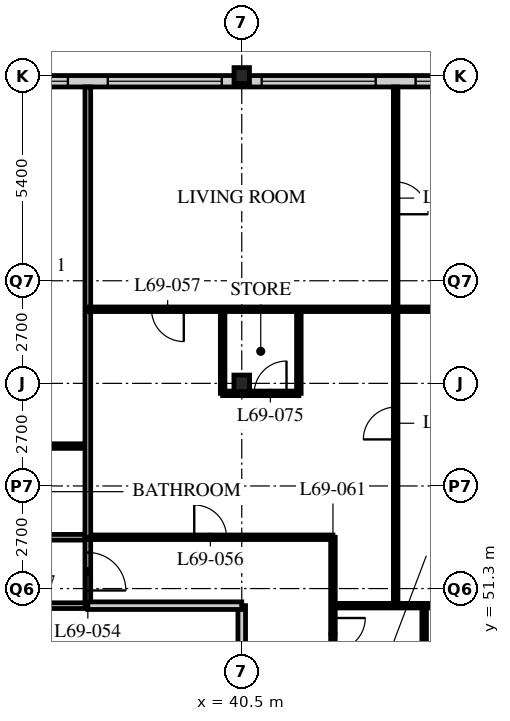
"""IFC4 building model, lengths in metres.
Left out: names, types, materials, properties, quantities, classifications, styles, units other than length and angle.
Written with IfcOpenShell. Run it as: python <this file> out.ifc"""

import sys

from ifc_helpers import new_model, si_unit, direction, frame, frame_2d, origin, origin_2d, place, context, subcontext, project, spatial, rectangle, i_section, extrude, element, fill, save


model = new_model("IFC4")
c1 = context("Model", 3, precision=1e-05, world=origin(), true_north=direction((0.0, 1.0)))
c2 = subcontext(c1, "Body", "Model", "MODEL_VIEW")
j1 = project(units=[si_unit("LENGTHUNIT", "METRE"), si_unit("PLANEANGLEUNIT", "RADIAN")], contexts=[c1])
p1 = place(None, origin())
s1 = spatial("IfcSite", under=j1, at=p1, CompositionType="ELEMENT")
p2 = place(p1, origin())
s2 = spatial("IfcBuilding", under=s1, at=p2, CompositionType="ELEMENT")
p3 = place(p2, frame((0.0, 0.0, 269.7)))
s3 = spatial("IfcBuildingStorey", under=s2, at=p3, CompositionType="ELEMENT", Elevation=269.7)
p4 = place(p3, frame((40.5, 56.7, 0.0), z_axis=(0.0, 0.0, 1.0), x_axis=(1.0, 0.0, 0.0)))
e1 = element("IfcColumn", 1, at=p4, inside=s3, PredefinedType="COLUMN", context=c2, shape_type="SweptSolid", body=[
    extrude(i_section(OverallWidth=0.412, OverallDepth=0.437, WebThickness=0.036, FlangeThickness=0.058, FilletRadius=0.015, at=origin_2d()), origin(), (0.0, 0.0, 1.0), 3.9),
])
p5 = place(p3, frame((40.5, 64.8, 0.0), z_axis=(0.0, 0.0, 1.0), x_axis=(1.0, 0.0, 0.0)))
e2 = element("IfcColumn", 2, at=p5, inside=s3, PredefinedType="COLUMN", context=c2, shape_type="SweptSolid", body=[
    extrude(i_section(OverallWidth=0.407, OverallDepth=0.419, WebThickness=0.031, FlangeThickness=0.049, FilletRadius=0.015, at=origin_2d()), origin(), (0.0, 0.0, 1.0), 3.9),
])
p6 = place(p3, frame((48.3, 64.65, 0.0), z_axis=(0.0, 0.0, 1.0), x_axis=(-1.0, 0.0, 0.0)))
e3 = element("IfcWall", 3, at=p6, inside=s3, PredefinedType="SOLIDWALL", context=c2, shape_type="SweptSolid", body=[
    extrude(rectangle(XDim=40.2, YDim=0.3, at=frame_2d((20.1, 0.0))), origin(), (0.0, 0.0, 1.0), 3.69),
])
p7 = place(p6, frame((0.225, 0.0, 0.6)))
e4 = element("IfcOpeningElement", 4, at=p7, cuts=e3, PredefinedType="OPENING", context=c2, shape_type="SweptSolid", body=[
    extrude(rectangle(XDim=3.0, YDim=2.4, at=frame_2d((1.5, 1.2))), frame((0.0, 0.16, 0.0), z_axis=(0.0, -1.0, 0.0), x_axis=(1.0, 0.0, 0.0)), (0.0, 0.0, 1.0), 0.32),
])
p8 = place(p6, frame((4.275, 0.0, 0.6)))
e5 = element("IfcOpeningElement", 5, at=p8, cuts=e3, PredefinedType="OPENING", context=c2, shape_type="SweptSolid", body=[
    extrude(rectangle(XDim=3.0, YDim=2.4, at=frame_2d((1.5, 1.2))), frame((0.0, 0.16, 0.0), z_axis=(0.0, -1.0, 0.0), x_axis=(1.0, 0.0, 0.0)), (0.0, 0.0, 1.0), 0.32),
])
p9 = place(p6, frame((8.325, 0.0, 0.6)))
e6 = element("IfcOpeningElement", 6, at=p9, cuts=e3, PredefinedType="OPENING", context=c2, shape_type="SweptSolid", body=[
    extrude(rectangle(XDim=3.0, YDim=2.4, at=frame_2d((1.5, 1.2))), frame((0.0, 0.16, 0.0), z_axis=(0.0, -1.0, 0.0), x_axis=(1.0, 0.0, 0.0)), (0.0, 0.0, 1.0), 0.32),
])
p10 = place(p6, frame((12.375, 0.0, 0.6)))
e7 = element("IfcOpeningElement", 7, at=p10, cuts=e3, PredefinedType="OPENING", context=c2, shape_type="SweptSolid", body=[
    extrude(rectangle(XDim=3.0, YDim=2.4, at=frame_2d((1.5, 1.2))), frame((0.0, 0.16, 0.0), z_axis=(0.0, -1.0, 0.0), x_axis=(1.0, 0.0, 0.0)), (0.0, 0.0, 1.0), 0.32),
])
p11 = place(p6, frame((16.425, 0.0, 0.6)))
e8 = element("IfcOpeningElement", 8, at=p11, cuts=e3, PredefinedType="OPENING", context=c2, shape_type="SweptSolid", body=[
    extrude(rectangle(XDim=3.0, YDim=2.4, at=frame_2d((1.5, 1.2))), frame((0.0, 0.16, 0.0), z_axis=(0.0, -1.0, 0.0), x_axis=(1.0, 0.0, 0.0)), (0.0, 0.0, 1.0), 0.32),
])
p12 = place(p6, frame((20.475, 0.0, 0.6)))
e9 = element("IfcOpeningElement", 9, at=p12, cuts=e3, PredefinedType="OPENING", context=c2, shape_type="SweptSolid", body=[
    extrude(rectangle(XDim=3.0, YDim=2.4, at=frame_2d((1.5, 1.2))), frame((0.0, 0.16, 0.0), z_axis=(0.0, -1.0, 0.0), x_axis=(1.0, 0.0, 0.0)), (0.0, 0.0, 1.0), 0.32),
])
p13 = place(p6, frame((24.525, 0.0, 0.6)))
e10 = element("IfcOpeningElement", 10, at=p13, cuts=e3, PredefinedType="OPENING", context=c2, shape_type="SweptSolid", body=[
    extrude(rectangle(XDim=3.0, YDim=2.4, at=frame_2d((1.5, 1.2))), frame((0.0, 0.16, 0.0), z_axis=(0.0, -1.0, 0.0), x_axis=(1.0, 0.0, 0.0)), (0.0, 0.0, 1.0), 0.32),
])
p14 = place(p6, frame((28.575, 0.0, 0.6)))
e11 = element("IfcOpeningElement", 11, at=p14, cuts=e3, PredefinedType="OPENING", context=c2, shape_type="SweptSolid", body=[
    extrude(rectangle(XDim=3.0, YDim=2.4, at=frame_2d((1.5, 1.2))), frame((0.0, 0.16, 0.0), z_axis=(0.0, -1.0, 0.0), x_axis=(1.0, 0.0, 0.0)), (0.0, 0.0, 1.0), 0.32),
])
p15 = place(p6, frame((32.625, 0.0, 0.6)))
e12 = element("IfcOpeningElement", 12, at=p15, cuts=e3, PredefinedType="OPENING", context=c2, shape_type="SweptSolid", body=[
    extrude(rectangle(XDim=3.0, YDim=2.4, at=frame_2d((1.5, 1.2))), frame((0.0, 0.16, 0.0), z_axis=(0.0, -1.0, 0.0), x_axis=(1.0, 0.0, 0.0)), (0.0, 0.0, 1.0), 0.32),
])
p16 = place(p6, frame((36.675, 0.0, 0.6)))
e13 = element("IfcOpeningElement", 13, at=p16, cuts=e3, PredefinedType="OPENING", context=c2, shape_type="SweptSolid", body=[
    extrude(rectangle(XDim=3.0, YDim=2.4, at=frame_2d((1.5, 1.2))), frame((0.0, 0.16, 0.0), z_axis=(0.0, -1.0, 0.0), x_axis=(1.0, 0.0, 0.0)), (0.0, 0.0, 1.0), 0.32),
])
p17 = place(p3, frame((12.15, 52.65, 0.0), z_axis=(0.0, 0.0, 1.0), x_axis=(1.0, 0.0, 0.0)))
e14 = element("IfcWall", 14, at=p17, inside=s3, PredefinedType="PARTITIONING", context=c2, shape_type="SweptSolid", body=[
    extrude(rectangle(XDim=24.3, YDim=0.15, at=frame_2d((12.15, 0.0))), origin(), (0.0, 0.0, 1.0), 3.69),
])
p18 = place(p17, frame((6.4, 0.0, 0.0)))
e15 = element("IfcOpeningElement", 15, at=p18, cuts=e14, PredefinedType="OPENING", context=c2, shape_type="SweptSolid", body=[
    extrude(rectangle(XDim=1.0, YDim=2.1, at=frame_2d((0.5, 1.05))), frame((0.0, 0.085, 0.0), z_axis=(0.0, -1.0, 0.0), x_axis=(1.0, 0.0, 0.0)), (0.0, 0.0, 1.0), 0.17),
])
p19 = place(p17, frame((8.5, 0.0, 0.0)))
e16 = element("IfcOpeningElement", 16, at=p19, cuts=e14, PredefinedType="OPENING", context=c2, shape_type="SweptSolid", body=[
    extrude(rectangle(XDim=1.0, YDim=2.1, at=frame_2d((0.5, 1.05))), frame((0.0, 0.085, 0.0), z_axis=(0.0, -1.0, 0.0), x_axis=(1.0, 0.0, 0.0)), (0.0, 0.0, 1.0), 0.17),
])
p20 = place(p17, frame((16.6, 0.0, 0.0)))
e17 = element("IfcOpeningElement", 17, at=p20, cuts=e14, PredefinedType="OPENING", context=c2, shape_type="SweptSolid", body=[
    extrude(rectangle(XDim=1.0, YDim=2.1, at=frame_2d((0.5, 1.05))), frame((0.0, 0.085, 0.0), z_axis=(0.0, -1.0, 0.0), x_axis=(1.0, 0.0, 0.0)), (0.0, 0.0, 1.0), 0.17),
])
p21 = place(p17, frame((1.525, 0.0, 0.0)))
e18 = element("IfcOpeningElement", 18, at=p21, cuts=e14, PredefinedType="OPENING", context=c2, shape_type="SweptSolid", body=[
    extrude(rectangle(XDim=1.0, YDim=2.1, at=frame_2d((0.5, 1.05))), frame((0.0, 0.085, 0.0), z_axis=(0.0, -1.0, 0.0), x_axis=(1.0, 0.0, 0.0)), (0.0, 0.0, 1.0), 0.17),
])
p22 = place(p3, frame((29.56, 50.85, 0.0), z_axis=(0.0, 0.0, 1.0), x_axis=(1.0, 0.0, 0.0)))
e19 = element("IfcWall", 19, at=p22, inside=s3, PredefinedType="PARTITIONING", context=c2, shape_type="SweptSolid", body=[
    extrude(rectangle(XDim=6.89, YDim=0.15, at=frame_2d((3.445, 0.0))), origin(), (0.0, 0.0, 1.0), 3.69),
])
p23 = place(p22, frame((1.49, 0.0, 0.0)))
e20 = element("IfcOpeningElement", 20, at=p23, cuts=e19, PredefinedType="OPENING", context=c2, shape_type="SweptSolid", body=[
    extrude(rectangle(XDim=1.0, YDim=2.1, at=frame_2d((0.5, 1.05))), frame((0.0, 0.085, 0.0), z_axis=(0.0, -1.0, 0.0), x_axis=(1.0, 0.0, 0.0)), (0.0, 0.0, 1.0), 0.17),
])
p24 = place(p22, frame((4.69, 0.0, 0.0)))
e21 = element("IfcOpeningElement", 21, at=p24, cuts=e19, PredefinedType="OPENING", context=c2, shape_type="SweptSolid", body=[
    extrude(rectangle(XDim=1.0, YDim=2.1, at=frame_2d((0.5, 1.05))), frame((0.0, 0.085, 0.0), z_axis=(0.0, -1.0, 0.0), x_axis=(1.0, 0.0, 0.0)), (0.0, 0.0, 1.0), 0.17),
])
p25 = place(p3, frame((36.45, 50.85, 0.0), z_axis=(0.0, 0.0, 1.0), x_axis=(0.0, 1.0, 0.0)))
e22 = element("IfcWall", 22, at=p25, inside=s3, PredefinedType="PARTITIONING", context=c2, shape_type="SweptSolid", body=[
    extrude(rectangle(XDim=1.8, YDim=0.15, at=frame_2d((0.9, 0.0))), origin(), (0.0, 0.0, 1.0), 3.69),
])
p26 = place(p25, frame((0.4, 0.0, 0.0)))
e23 = element("IfcOpeningElement", 23, at=p26, cuts=e22, PredefinedType="OPENING", context=c2, shape_type="SweptSolid", body=[
    extrude(rectangle(XDim=1.0, YDim=2.1, at=frame_2d((0.5, 1.05))), frame((0.0, 0.085, 0.0), z_axis=(0.0, -1.0, 0.0), x_axis=(1.0, 0.0, 0.0)), (0.0, 0.0, 1.0), 0.17),
])
p27 = place(p3, frame((40.5, 40.5, 0.0), z_axis=(0.0, 0.0, 1.0), x_axis=(0.0, 1.0, 0.0)))
e24 = element("IfcWall", 24, at=p27, inside=s3, PredefinedType="SOLIDWALL", context=c2, shape_type="SweptSolid", body=[
    extrude(rectangle(XDim=10.35, YDim=0.2, at=frame_2d((5.175, 0.0))), origin(), (0.0, 0.0, 1.0), 3.078),
])
p28 = place(p3, frame((20.25, 55.05, 0.0), z_axis=(0.0, 0.0, 1.0), x_axis=(1.0, 0.0, 0.0)))
e25 = element("IfcWall", 25, at=p28, inside=s3, PredefinedType="PARTITIONING", context=c2, shape_type="SweptSolid", body=[
    extrude(rectangle(XDim=16.2, YDim=0.12, at=frame_2d((8.1, 0.0))), origin(), (0.0, 0.0, 1.0), 3.69),
])
p29 = place(p28, frame((0.975, 0.0, 0.0)))
e26 = element("IfcOpeningElement", 26, at=p29, cuts=e25, PredefinedType="OPENING", context=c2, shape_type="SweptSolid", body=[
    extrude(rectangle(XDim=0.85, YDim=2.1, at=frame_2d((0.425, 1.05))), frame((0.0, 0.07, 0.0), z_axis=(0.0, -1.0, 0.0), x_axis=(1.0, 0.0, 0.0)), (0.0, 0.0, 1.0), 0.14),
])
p30 = place(p28, frame((4.375, 0.0, 0.0)))
e27 = element("IfcOpeningElement", 27, at=p30, cuts=e25, PredefinedType="OPENING", context=c2, shape_type="SweptSolid", body=[
    extrude(rectangle(XDim=0.85, YDim=2.1, at=frame_2d((0.425, 1.05))), frame((0.0, 0.07, 0.0), z_axis=(0.0, -1.0, 0.0), x_axis=(1.0, 0.0, 0.0)), (0.0, 0.0, 1.0), 0.14),
])
p31 = place(p28, frame((9.075, 0.0, 0.0)))
e28 = element("IfcOpeningElement", 28, at=p31, cuts=e25, PredefinedType="OPENING", context=c2, shape_type="SweptSolid", body=[
    extrude(rectangle(XDim=0.85, YDim=2.1, at=frame_2d((0.425, 1.05))), frame((0.0, 0.07, 0.0), z_axis=(0.0, -1.0, 0.0), x_axis=(1.0, 0.0, 0.0)), (0.0, 0.0, 1.0), 0.14),
])
p32 = place(p28, frame((12.475, 0.0, 0.0)))
e29 = element("IfcOpeningElement", 29, at=p32, cuts=e25, PredefinedType="OPENING", context=c2, shape_type="SweptSolid", body=[
    extrude(rectangle(XDim=0.85, YDim=2.1, at=frame_2d((0.425, 1.05))), frame((0.0, 0.07, 0.0), z_axis=(0.0, -1.0, 0.0), x_axis=(1.0, 0.0, 0.0)), (0.0, 0.0, 1.0), 0.14),
])
p33 = place(p3, frame((42.9, 52.65, 0.0), z_axis=(0.0, 0.0, 1.0), x_axis=(0.0, -1.0, 0.0)))
e30 = element("IfcWall", 30, at=p33, inside=s3, PredefinedType="PARTITIONING", context=c2, shape_type="SweptSolid", body=[
    extrude(rectangle(XDim=12.15, YDim=0.12, at=frame_2d((6.075, 0.0))), origin(), (0.0, 0.0, 1.0), 3.69),
])
p34 = place(p33, frame((2.125, 0.0, 0.0)))
e31 = element("IfcOpeningElement", 31, at=p34, cuts=e30, PredefinedType="OPENING", context=c2, shape_type="SweptSolid", body=[
    extrude(rectangle(XDim=0.85, YDim=2.1, at=frame_2d((0.425, 1.05))), frame((0.0, 0.07, 0.0), z_axis=(0.0, -1.0, 0.0), x_axis=(1.0, 0.0, 0.0)), (0.0, 0.0, 1.0), 0.14),
])
p35 = place(p33, frame((8.425, 0.0, 0.0)))
e32 = element("IfcOpeningElement", 32, at=p35, cuts=e30, PredefinedType="OPENING", context=c2, shape_type="SweptSolid", body=[
    extrude(rectangle(XDim=0.85, YDim=2.1, at=frame_2d((0.425, 1.05))), frame((0.0, 0.07, 0.0), z_axis=(0.0, -1.0, 0.0), x_axis=(1.0, 0.0, 0.0)), (0.0, 0.0, 1.0), 0.14),
])
p36 = place(p3, frame((36.45, 52.65, 0.0), z_axis=(0.0, 0.0, 1.0), x_axis=(1.0, 0.0, 0.0)))
e33 = element("IfcWall", 33, at=p36, inside=s3, PredefinedType="PARTITIONING", context=c2, shape_type="SweptSolid", body=[
    extrude(rectangle(XDim=6.45, YDim=0.12, at=frame_2d((3.225, 0.0))), origin(), (0.0, 0.0, 1.0), 3.69),
])
p37 = place(p36, frame((2.8, 0.0, 0.0)))
e34 = element("IfcOpeningElement", 34, at=p37, cuts=e33, PredefinedType="OPENING", context=c2, shape_type="SweptSolid", body=[
    extrude(rectangle(XDim=0.85, YDim=2.1, at=frame_2d((0.425, 1.05))), frame((0.0, 0.07, 0.0), z_axis=(0.0, -1.0, 0.0), x_axis=(1.0, 0.0, 0.0)), (0.0, 0.0, 1.0), 0.14),
])
p38 = place(p3, frame((36.45, 50.85, 0.0), z_axis=(0.0, 0.0, 1.0), x_axis=(1.0, 0.0, 0.0)))
e35 = element("IfcWall", 35, at=p38, inside=s3, PredefinedType="SOLIDWALL", context=c2, shape_type="SweptSolid", body=[
    extrude(rectangle(XDim=4.05, YDim=0.2, at=frame_2d((2.025, 0.0))), origin(), (0.0, 0.0, 1.0), 3.69),
])
p39 = place(p3, frame((42.9, 50.85, 0.0), z_axis=(0.0, 0.0, 1.0), x_axis=(1.0, 0.0, 0.0)))
e36 = element("IfcWall", 36, at=p39, inside=s3, PredefinedType="PARTITIONING", context=c2, shape_type="SweptSolid", body=[
    extrude(rectangle(XDim=13.5, YDim=0.12, at=frame_2d((6.75, 0.0))), origin(), (0.0, 0.0, 1.0), 3.69),
])
p40 = place(p3, frame((36.45, 64.5, 0.0), z_axis=(0.0, 0.0, 1.0), x_axis=(0.0, -1.0, 0.0)))
e37 = element("IfcWall", 37, at=p40, inside=s3, PredefinedType="PARTITIONING", context=c2, shape_type="SweptSolid", body=[
    extrude(rectangle(XDim=11.85, YDim=0.15, at=frame_2d((5.925, 0.0))), origin(), (0.0, 0.0, 1.0), 3.69),
])
p41 = place(p3, frame((36.45, 58.65, 0.0), z_axis=(0.0, 0.0, 1.0), x_axis=(1.0, 0.0, 0.0)))
e38 = element("IfcWall", 38, at=p41, inside=s3, PredefinedType="PARTITIONING", context=c2, shape_type="SweptSolid", body=[
    extrude(rectangle(XDim=15.9, YDim=0.12, at=frame_2d((7.95, 0.0))), origin(), (0.0, 0.0, 1.0), 3.69),
])
p42 = place(p41, frame((1.675, 0.0, 0.0)))
e39 = element("IfcOpeningElement", 39, at=p42, cuts=e38, PredefinedType="OPENING", context=c2, shape_type="SweptSolid", body=[
    extrude(rectangle(XDim=0.85, YDim=2.1, at=frame_2d((0.425, 1.05))), frame((0.0, 0.07, 0.0), z_axis=(0.0, -1.0, 0.0), x_axis=(1.0, 0.0, 0.0)), (0.0, 0.0, 1.0), 0.14),
])
p43 = place(p3, frame((44.55, 64.5, 0.0), z_axis=(0.0, 0.0, 1.0), x_axis=(0.0, -1.0, 0.0)))
e40 = element("IfcWall", 40, at=p43, inside=s3, PredefinedType="PARTITIONING", context=c2, shape_type="SweptSolid", body=[
    extrude(rectangle(XDim=13.65, YDim=0.12, at=frame_2d((6.825, 0.0))), origin(), (0.0, 0.0, 1.0), 3.69),
])
p44 = place(p43, frame((8.425, 0.0, 0.0)))
e41 = element("IfcOpeningElement", 41, at=p44, cuts=e40, PredefinedType="OPENING", context=c2, shape_type="SweptSolid", body=[
    extrude(rectangle(XDim=0.85, YDim=2.1, at=frame_2d((0.425, 1.05))), frame((0.0, 0.07, 0.0), z_axis=(0.0, -1.0, 0.0), x_axis=(1.0, 0.0, 0.0)), (0.0, 0.0, 1.0), 0.14),
])
p45 = place(p43, frame((2.5, 0.0, 0.0)))
e42 = element("IfcOpeningElement", 42, at=p45, cuts=e40, PredefinedType="OPENING", context=c2, shape_type="SweptSolid", body=[
    extrude(rectangle(XDim=0.85, YDim=2.1, at=frame_2d((0.425, 1.05))), frame((0.0, 0.07, 0.0), z_axis=(0.0, -1.0, 0.0), x_axis=(1.0, 0.0, 0.0)), (0.0, 0.0, 1.0), 0.14),
])
p46 = place(p3, frame((45.3, 50.85, 0.0), z_axis=(0.0, 0.0, 1.0), x_axis=(0.0, -1.0, 0.0)))
e43 = element("IfcWall", 43, at=p46, inside=s3, PredefinedType="PARTITIONING", context=c2, shape_type="SweptSolid", body=[
    extrude(rectangle(XDim=4.01, YDim=0.12, at=frame_2d((2.005, 0.0))), origin(), (0.0, 0.0, 1.0), 3.69),
])
p47 = place(p46, frame((2.885, 0.0, 0.0)))
e44 = element("IfcOpeningElement", 44, at=p47, cuts=e43, PredefinedType="OPENING", context=c2, shape_type="SweptSolid", body=[
    extrude(rectangle(XDim=0.85, YDim=2.1, at=frame_2d((0.425, 1.05))), frame((0.0, 0.07, 0.0), z_axis=(0.0, -1.0, 0.0), x_axis=(1.0, 0.0, 0.0)), (0.0, 0.0, 1.0), 0.14),
])
for number, where, z_axis, x_axis in (
    (45, (39.997, 58.65, 0.0), (0.0, 0.0, 1.0), (0.0, -1.0, 0.0)),
    (46, (42.003, 58.65, 0.0), (0.0, 0.0, 1.0), (0.0, -1.0, 0.0)),
):
    element("IfcWall", number, at=place(p3, frame(where, z_axis=z_axis, x_axis=x_axis)), inside=s3, PredefinedType="PARTITIONING", context=c2, shape_type="SweptSolid", body=[
        extrude(rectangle(XDim=2.213, YDim=0.12, at=frame_2d((1.106, 0.0))), origin(), (0.0, 0.0, 1.0), 3.69),
    ])
p48 = place(p3, frame((39.997, 56.437, 0.0), z_axis=(0.0, 0.0, 1.0), x_axis=(1.0, 0.0, 0.0)))
e47 = element("IfcWall", 47, at=p48, inside=s3, PredefinedType="PARTITIONING", context=c2, shape_type="SweptSolid", body=[
    extrude(rectangle(XDim=2.006, YDim=0.12, at=frame_2d((1.003, 0.0))), origin(), (0.0, 0.0, 1.0), 3.69),
])
p49 = place(p48, frame((0.831, 0.0, 0.0)))
e48 = element("IfcOpeningElement", 48, at=p49, cuts=e47, PredefinedType="OPENING", context=c2, shape_type="SweptSolid", body=[
    extrude(rectangle(XDim=0.85, YDim=2.1, at=frame_2d((0.425, 1.05))), frame((0.0, 0.07, 0.0), z_axis=(0.0, -1.0, 0.0), x_axis=(1.0, 0.0, 0.0)), (0.0, 0.0, 1.0), 0.14),
])
p50 = place(p7, origin())
e49 = element("IfcWindow", 49, at=p50, inside=s3, PartitioningType="SINGLE_PANEL", PredefinedType="WINDOW", context=c2, shape_type="SweptSolid", body=[
    extrude(rectangle(XDim=3.0, YDim=2.4, at=frame_2d((1.5, 1.2))), frame((0.0, 0.03, 0.0), z_axis=(0.0, -1.0, 0.0), x_axis=(1.0, 0.0, 0.0)), (0.0, 0.0, 1.0), 0.06),
])
fill(e4, e49)
p51 = place(p8, origin())
e50 = element("IfcWindow", 50, at=p51, inside=s3, PartitioningType="SINGLE_PANEL", PredefinedType="WINDOW", context=c2, shape_type="SweptSolid", body=[
    extrude(rectangle(XDim=3.0, YDim=2.4, at=frame_2d((1.5, 1.2))), frame((0.0, 0.03, 0.0), z_axis=(0.0, -1.0, 0.0), x_axis=(1.0, 0.0, 0.0)), (0.0, 0.0, 1.0), 0.06),
])
fill(e5, e50)
p52 = place(p9, origin())
e51 = element("IfcWindow", 51, at=p52, inside=s3, PartitioningType="SINGLE_PANEL", PredefinedType="WINDOW", context=c2, shape_type="SweptSolid", body=[
    extrude(rectangle(XDim=3.0, YDim=2.4, at=frame_2d((1.5, 1.2))), frame((0.0, 0.03, 0.0), z_axis=(0.0, -1.0, 0.0), x_axis=(1.0, 0.0, 0.0)), (0.0, 0.0, 1.0), 0.06),
])
fill(e6, e51)
p53 = place(p10, origin())
e52 = element("IfcWindow", 52, at=p53, inside=s3, PartitioningType="SINGLE_PANEL", PredefinedType="WINDOW", context=c2, shape_type="SweptSolid", body=[
    extrude(rectangle(XDim=3.0, YDim=2.4, at=frame_2d((1.5, 1.2))), frame((0.0, 0.03, 0.0), z_axis=(0.0, -1.0, 0.0), x_axis=(1.0, 0.0, 0.0)), (0.0, 0.0, 1.0), 0.06),
])
fill(e7, e52)
p54 = place(p26, origin())
e53 = element("IfcDoor", 53, at=p54, inside=s3, OperationType="SINGLE_SWING_RIGHT", PredefinedType="DOOR", context=c2, shape_type="SweptSolid", body=[
    extrude(rectangle(XDim=1.0, YDim=2.1, at=frame_2d((0.5, 1.05))), frame((0.0, 0.025, 0.0), z_axis=(0.0, -1.0, 0.0), x_axis=(1.0, 0.0, 0.0)), (0.0, 0.0, 1.0), 0.05),
])
fill(e23, e53)
p55 = place(p37, origin())
e54 = element("IfcDoor", 54, at=p55, inside=s3, OperationType="SINGLE_SWING_LEFT", PredefinedType="DOOR", context=c2, shape_type="SweptSolid", body=[
    extrude(rectangle(XDim=0.85, YDim=2.1, at=frame_2d((0.425, 1.05))), frame((0.0, 0.025, 0.0), z_axis=(0.0, -1.0, 0.0), x_axis=(1.0, 0.0, 0.0)), (0.0, 0.0, 1.0), 0.05),
])
fill(e34, e54)
p56 = place(p42, origin())
e55 = element("IfcDoor", 55, at=p56, inside=s3, OperationType="SINGLE_SWING_LEFT", PredefinedType="DOOR", context=c2, shape_type="SweptSolid", body=[
    extrude(rectangle(XDim=0.85, YDim=2.1, at=frame_2d((0.425, 1.05))), frame((0.0, 0.025, 0.0), z_axis=(0.0, -1.0, 0.0), x_axis=(1.0, 0.0, 0.0)), (0.0, 0.0, 1.0), 0.05),
])
fill(e39, e55)
p57 = place(p44, origin())
e56 = element("IfcDoor", 56, at=p57, inside=s3, OperationType="SINGLE_SWING_LEFT", PredefinedType="DOOR", context=c2, shape_type="SweptSolid", body=[
    extrude(rectangle(XDim=0.85, YDim=2.1, at=frame_2d((0.425, 1.05))), frame((0.0, 0.025, 0.0), z_axis=(0.0, -1.0, 0.0), x_axis=(1.0, 0.0, 0.0)), (0.0, 0.0, 1.0), 0.05),
])
fill(e41, e56)
p58 = place(p45, origin())
e57 = element("IfcDoor", 57, at=p58, inside=s3, OperationType="SINGLE_SWING_RIGHT", PredefinedType="DOOR", context=c2, shape_type="SweptSolid", body=[
    extrude(rectangle(XDim=0.85, YDim=2.1, at=frame_2d((0.425, 1.05))), frame((0.0, 0.025, 0.0), z_axis=(0.0, -1.0, 0.0), x_axis=(1.0, 0.0, 0.0)), (0.0, 0.0, 1.0), 0.05),
])
fill(e42, e57)
p59 = place(p34, origin())
e58 = element("IfcDoor", 58, at=p59, inside=s3, OperationType="SINGLE_SWING_LEFT", PredefinedType="DOOR", context=c2, shape_type="SweptSolid", body=[
    extrude(rectangle(XDim=0.85, YDim=2.1, at=frame_2d((0.425, 1.05))), frame((0.0, 0.025, 0.0), z_axis=(0.0, -1.0, 0.0), x_axis=(1.0, 0.0, 0.0)), (0.0, 0.0, 1.0), 0.05),
])
fill(e31, e58)
p60 = place(p49, origin())
e59 = element("IfcDoor", 59, at=p60, inside=s3, OperationType="SINGLE_SWING_RIGHT", PredefinedType="DOOR", context=c2, shape_type="SweptSolid", body=[
    extrude(rectangle(XDim=0.85, YDim=2.1, at=frame_2d((0.425, 1.05))), frame((0.0, 0.025, 0.0), z_axis=(0.0, -1.0, 0.0), x_axis=(1.0, 0.0, 0.0)), (0.0, 0.0, 1.0), 0.05),
])
fill(e48, e59)
save(model, sys.argv[1])
